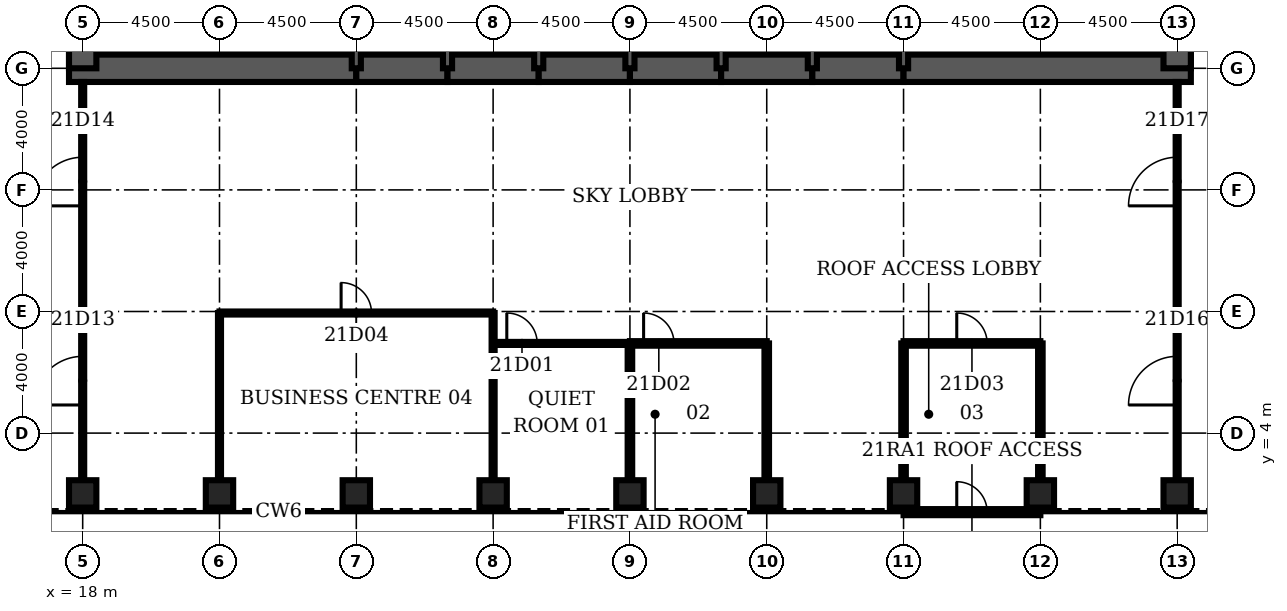
"""IFC4 building model, lengths in metres.
Left out: names, types, materials, properties, quantities, classifications, styles, units other than length and angle.
Written with IfcOpenShell. Run it as: python <this file> out.ifc"""

import sys

from ifc_helpers import new_model, si_unit, direction, frame, frame_2d, origin, origin_2d, place, context, subcontext, project, spatial, rectangle, hollow_rectangle, extrude, element, fill, save


model = new_model("IFC4")
c1 = context("Model", 3, precision=1e-05, world=origin(), true_north=direction((0.0, 1.0)))
c2 = subcontext(c1, "Body", "Model", "MODEL_VIEW")
j1 = project(units=[si_unit("LENGTHUNIT", "METRE"), si_unit("PLANEANGLEUNIT", "RADIAN")], contexts=[c1])
p1 = place(None, origin())
s1 = spatial("IfcSite", under=j1, at=p1, CompositionType="ELEMENT")
p2 = place(p1, origin())
s2 = spatial("IfcBuilding", under=s1, at=p2, CompositionType="ELEMENT")
p3 = place(p2, frame((0.0, 0.0, 100.5)))
s3 = spatial("IfcBuildingStorey", under=s2, at=p3, CompositionType="ELEMENT", Elevation=100.5)
for number, where, z_axis, x_axis in (
    (1, (18.0, 2.0, 0.0), (0.0, 0.0, 1.0), (0.0, 1.0, 0.0)),
    (2, (22.5, 2.0, 0.0), (0.0, 0.0, 1.0), (0.0, 1.0, 0.0)),
    (3, (27.0, 2.0, 0.0), (0.0, 0.0, 1.0), (0.0, 1.0, 0.0)),
    (4, (31.5, 2.0, 0.0), (0.0, 0.0, 1.0), (0.0, 1.0, 0.0)),
    (5, (36.0, 2.0, 0.0), (0.0, 0.0, 1.0), (0.0, 1.0, 0.0)),
    (6, (40.5, 2.0, 0.0), (0.0, 0.0, 1.0), (0.0, 1.0, 0.0)),
    (7, (45.0, 2.0, 0.0), (0.0, 0.0, 1.0), (0.0, 1.0, 0.0)),
    (8, (49.5, 2.0, 0.0), (0.0, 0.0, 1.0), (0.0, 1.0, 0.0)),
    (9, (54.0, 2.0, 0.0), (0.0, 0.0, 1.0), (0.0, 1.0, 0.0)),
):
    element("IfcColumn", number, at=place(p3, frame(where, z_axis=z_axis, x_axis=x_axis)), inside=s3, PredefinedType="COLUMN", context=c2, shape_type="SweptSolid", body=[
        extrude(hollow_rectangle(XDim=0.9, YDim=0.9, WallThickness=0.11, at=origin_2d()), origin(), (0.0, 0.0, 1.0), 4.2),
    ])
p4 = place(p3, frame((17.55, 16.0, 0.0), z_axis=(0.0, 0.0, 1.0), x_axis=(1.0, 0.0, 0.0)))
e10 = element("IfcWall", 10, at=p4, inside=s3, PredefinedType="SHEAR", context=c2, shape_type="SweptSolid", body=[
    extrude(rectangle(XDim=9.45, YDim=0.9, at=frame_2d((4.725, 0.0))), origin(), (0.0, 0.0, 1.0), 4.2),
])
for number, where, z_axis, x_axis in (
    (11, (27.0, 16.0, 0.0), (0.0, 0.0, 1.0), (1.0, 0.0, 0.0)),
    (12, (30.0, 16.0, 0.0), (0.0, 0.0, 1.0), (1.0, 0.0, 0.0)),
    (13, (33.0, 16.0, 0.0), (0.0, 0.0, 1.0), (1.0, 0.0, 0.0)),
    (14, (36.0, 16.0, 0.0), (0.0, 0.0, 1.0), (1.0, 0.0, 0.0)),
    (15, (39.0, 16.0, 0.0), (0.0, 0.0, 1.0), (1.0, 0.0, 0.0)),
    (16, (42.0, 16.0, 0.0), (0.0, 0.0, 1.0), (1.0, 0.0, 0.0)),
):
    element("IfcWall", number, at=place(p3, frame(where, z_axis=z_axis, x_axis=x_axis)), inside=s3, PredefinedType="SHEAR", context=c2, shape_type="SweptSolid", body=[
        extrude(rectangle(XDim=3.0, YDim=0.9, at=frame_2d((1.5, 0.0))), origin(), (0.0, 0.0, 1.0), 4.2),
    ])
p5 = place(p3, frame((45.0, 16.0, 0.0), z_axis=(0.0, 0.0, 1.0), x_axis=(1.0, 0.0, 0.0)))
e17 = element("IfcWall", 17, at=p5, inside=s3, PredefinedType="SHEAR", context=c2, shape_type="SweptSolid", body=[
    extrude(rectangle(XDim=9.45, YDim=0.9, at=frame_2d((4.725, 0.0))), origin(), (0.0, 0.0, 1.0), 4.2),
])
for number, where, z_axis, x_axis in (
    (18, (18.0, 19.2, 0.0), (0.0, 0.0, 1.0), (0.0, -1.0, 0.0)),
    (19, (54.0, 16.0, 0.0), (0.0, 0.0, 1.0), (0.0, 1.0, 0.0)),
):
    element("IfcWall", number, at=place(p3, frame(where, z_axis=z_axis, x_axis=x_axis)), inside=s3, PredefinedType="SHEAR", context=c2, shape_type="SweptSolid", body=[
        extrude(rectangle(XDim=3.2, YDim=0.9, at=frame_2d((1.6, 0.0))), origin(), (0.0, 0.0, 1.0), 4.2),
    ])
for number, where, z_axis, x_axis in (
    (20, (27.0, 16.0, 0.0), (0.0, 0.0, 1.0), (0.0, 1.0, 0.0)),
    (21, (30.0, 16.0, 0.0), (0.0, 0.0, 1.0), (0.0, 1.0, 0.0)),
    (22, (33.0, 16.0, 0.0), (0.0, 0.0, 1.0), (0.0, 1.0, 0.0)),
    (23, (36.0, 16.0, 0.0), (0.0, 0.0, 1.0), (0.0, 1.0, 0.0)),
    (24, (39.0, 16.0, 0.0), (0.0, 0.0, 1.0), (0.0, 1.0, 0.0)),
    (25, (42.0, 16.0, 0.0), (0.0, 0.0, 1.0), (0.0, 1.0, 0.0)),
    (26, (45.0, 16.0, 0.0), (0.0, 0.0, 1.0), (0.0, 1.0, 0.0)),
):
    element("IfcWall", number, at=place(p3, frame(where, z_axis=z_axis, x_axis=x_axis)), inside=s3, PredefinedType="SOLIDWALL", context=c2, shape_type="SweptSolid", body=[
        extrude(rectangle(XDim=3.2, YDim=0.3, at=frame_2d((1.6, 0.0))), origin(), (0.0, 0.0, 1.0), 4.2),
    ])
p6 = place(p3, frame((31.5, 6.95, 0.0), z_axis=(0.0, 0.0, 1.0), x_axis=(1.0, 0.0, 0.0)))
e27 = element("IfcWall", 27, at=p6, inside=s3, PredefinedType="PARTITIONING", context=c2, shape_type="SweptSolid", body=[
    extrude(rectangle(XDim=4.5, YDim=0.1, at=frame_2d((2.25, 0.0))), origin(), (0.0, 0.0, 1.0), 3.0),
])
p7 = place(p6, frame((0.45, 0.0, 0.0)))
e28 = element("IfcOpeningElement", 28, at=p7, cuts=e27, PredefinedType="OPENING", context=c2, shape_type="SweptSolid", body=[
    extrude(rectangle(XDim=1.0, YDim=2.1, at=frame_2d((0.5, 1.05))), frame((0.0, 0.06, 0.0), z_axis=(0.0, -1.0, 0.0), x_axis=(1.0, 0.0, 0.0)), (0.0, 0.0, 1.0), 0.12),
])
p8 = place(p3, frame((36.0, 6.95, 0.0), z_axis=(0.0, 0.0, 1.0), x_axis=(1.0, 0.0, 0.0)))
e29 = element("IfcWall", 29, at=p8, inside=s3, PredefinedType="PARTITIONING", context=c2, shape_type="SweptSolid", body=[
    extrude(rectangle(XDim=4.5, YDim=0.15, at=frame_2d((2.25, 0.0))), origin(), (0.0, 0.0, 1.0), 3.0),
])
p9 = place(p8, frame((0.45, 0.0, 0.0)))
e30 = element("IfcOpeningElement", 30, at=p9, cuts=e29, PredefinedType="OPENING", context=c2, shape_type="SweptSolid", body=[
    extrude(rectangle(XDim=1.0, YDim=2.1, at=frame_2d((0.5, 1.05))), frame((0.0, 0.085, 0.0), z_axis=(0.0, -1.0, 0.0), x_axis=(1.0, 0.0, 0.0)), (0.0, 0.0, 1.0), 0.17),
])
p10 = place(p3, frame((45.0, 6.95, 0.0), z_axis=(0.0, 0.0, 1.0), x_axis=(1.0, 0.0, 0.0)))
e31 = element("IfcWall", 31, at=p10, inside=s3, PredefinedType="PARTITIONING", context=c2, shape_type="SweptSolid", body=[
    extrude(rectangle(XDim=4.5, YDim=0.15, at=frame_2d((2.25, 0.0))), origin(), (0.0, 0.0, 1.0), 3.0),
])
p11 = place(p10, frame((1.75, 0.0, 0.0)))
e32 = element("IfcOpeningElement", 32, at=p11, cuts=e31, PredefinedType="OPENING", context=c2, shape_type="SweptSolid", body=[
    extrude(rectangle(XDim=1.0, YDim=2.1, at=frame_2d((0.5, 1.05))), frame((0.0, 0.085, 0.0), z_axis=(0.0, -1.0, 0.0), x_axis=(1.0, 0.0, 0.0)), (0.0, 0.0, 1.0), 0.17),
])
p12 = place(p3, frame((22.5, 7.95, 0.0), z_axis=(0.0, 0.0, 1.0), x_axis=(1.0, 0.0, 0.0)))
e33 = element("IfcWall", 33, at=p12, inside=s3, PredefinedType="PARTITIONING", context=c2, shape_type="SweptSolid", body=[
    extrude(rectangle(XDim=9.0, YDim=0.1, at=frame_2d((4.5, 0.0))), origin(), (0.0, 0.0, 1.0), 3.0),
])
p13 = place(p12, frame((4.0, 0.0, 0.0)))
e34 = element("IfcOpeningElement", 34, at=p13, cuts=e33, PredefinedType="OPENING", context=c2, shape_type="SweptSolid", body=[
    extrude(rectangle(XDim=1.0, YDim=2.1, at=frame_2d((0.5, 1.05))), frame((0.0, 0.06, 0.0), z_axis=(0.0, -1.0, 0.0), x_axis=(1.0, 0.0, 0.0)), (0.0, 0.0, 1.0), 0.12),
])
p14 = place(p3, frame((18.0, 2.45, 0.0), z_axis=(0.0, 0.0, 1.0), x_axis=(0.0, 1.0, 0.0)))
e35 = element("IfcWall", 35, at=p14, inside=s3, PredefinedType="PARTITIONING", context=c2, shape_type="SweptSolid", body=[
    extrude(rectangle(XDim=13.1, YDim=0.1, at=frame_2d((6.55, 0.0))), origin(), (0.0, 0.0, 1.0), 3.0),
])
p15 = place(p14, frame((2.475, 0.0, 0.0)))
e36 = element("IfcOpeningElement", 36, at=p15, cuts=e35, PredefinedType="OPENING", context=c2, shape_type="SweptSolid", body=[
    extrude(rectangle(XDim=1.6, YDim=2.1, at=frame_2d((0.8, 1.05))), frame((0.0, 0.06, 0.0), z_axis=(0.0, -1.0, 0.0), x_axis=(1.0, 0.0, 0.0)), (0.0, 0.0, 1.0), 0.12),
])
p16 = place(p14, frame((9.025, 0.0, 0.0)))
e37 = element("IfcOpeningElement", 37, at=p16, cuts=e35, PredefinedType="OPENING", context=c2, shape_type="SweptSolid", body=[
    extrude(rectangle(XDim=1.6, YDim=2.1, at=frame_2d((0.8, 1.05))), frame((0.0, 0.06, 0.0), z_axis=(0.0, -1.0, 0.0), x_axis=(1.0, 0.0, 0.0)), (0.0, 0.0, 1.0), 0.12),
])
for number, where, z_axis, x_axis in (
    (38, (22.5, 2.45, 0.0), (0.0, 0.0, 1.0), (0.0, 1.0, 0.0)),
    (39, (31.5, 2.45, 0.0), (0.0, 0.0, 1.0), (0.0, 1.0, 0.0)),
):
    element("IfcWall", number, at=place(p3, frame(where, z_axis=z_axis, x_axis=x_axis)), inside=s3, PredefinedType="PARTITIONING", context=c2, shape_type="SweptSolid", body=[
        extrude(rectangle(XDim=5.5, YDim=0.1, at=frame_2d((2.75, 0.0))), origin(), (0.0, 0.0, 1.0), 3.0),
    ])
for number, where, z_axis, x_axis in (
    (40, (36.0, 2.45, 0.0), (0.0, 0.0, 1.0), (0.0, 1.0, 0.0)),
    (41, (40.5, 2.45, 0.0), (0.0, 0.0, 1.0), (0.0, 1.0, 0.0)),
    (42, (45.0, 2.45, 0.0), (0.0, 0.0, 1.0), (0.0, 1.0, 0.0)),
    (43, (49.5, 2.45, 0.0), (0.0, 0.0, 1.0), (0.0, 1.0, 0.0)),
):
    element("IfcWall", number, at=place(p3, frame(where, z_axis=z_axis, x_axis=x_axis)), inside=s3, PredefinedType="PARTITIONING", context=c2, shape_type="SweptSolid", body=[
        extrude(rectangle(XDim=4.5, YDim=0.15, at=frame_2d((2.25, 0.0))), origin(), (0.0, 0.0, 1.0), 3.0),
    ])
p17 = place(p3, frame((54.0, 2.45, 0.0), z_axis=(0.0, 0.0, 1.0), x_axis=(0.0, 1.0, 0.0)))
e44 = element("IfcWall", 44, at=p17, inside=s3, PredefinedType="PARTITIONING", context=c2, shape_type="SweptSolid", body=[
    extrude(rectangle(XDim=13.1, YDim=0.1, at=frame_2d((6.55, 0.0))), origin(), (0.0, 0.0, 1.0), 3.0),
])
p18 = place(p17, frame((2.475, 0.0, 0.0)))
e45 = element("IfcOpeningElement", 45, at=p18, cuts=e44, PredefinedType="OPENING", context=c2, shape_type="SweptSolid", body=[
    extrude(rectangle(XDim=1.6, YDim=2.1, at=frame_2d((0.8, 1.05))), frame((0.0, 0.06, 0.0), z_axis=(0.0, -1.0, 0.0), x_axis=(1.0, 0.0, 0.0)), (0.0, 0.0, 1.0), 0.12),
])
p19 = place(p17, frame((9.025, 0.0, 0.0)))
e46 = element("IfcOpeningElement", 46, at=p19, cuts=e44, PredefinedType="OPENING", context=c2, shape_type="SweptSolid", body=[
    extrude(rectangle(XDim=1.6, YDim=2.1, at=frame_2d((0.8, 1.05))), frame((0.0, 0.06, 0.0), z_axis=(0.0, -1.0, 0.0), x_axis=(1.0, 0.0, 0.0)), (0.0, 0.0, 1.0), 0.12),
])
p20 = place(p3, frame((45.0, 1.4, 0.0), z_axis=(0.0, 0.0, 1.0), x_axis=(1.0, 0.0, 0.0)))
e47 = element("IfcWall", 47, at=p20, inside=s3, PredefinedType="SOLIDWALL", context=c2, shape_type="SweptSolid", body=[
    extrude(rectangle(XDim=4.5, YDim=0.2, at=frame_2d((2.25, 0.0))), origin(), (0.0, 0.0, 1.0), 4.04),
])
p21 = place(p20, frame((1.75, 0.0, 0.0)))
e48 = element("IfcOpeningElement", 48, at=p21, cuts=e47, PredefinedType="OPENING", context=c2, shape_type="SweptSolid", body=[
    extrude(rectangle(XDim=1.0, YDim=2.1, at=frame_2d((0.5, 1.05))), frame((0.0, 0.11, 0.0), z_axis=(0.0, -1.0, 0.0), x_axis=(1.0, 0.0, 0.0)), (0.0, 0.0, 1.0), 0.22),
])
p22 = place(p7, origin())
e49 = element("IfcDoor", 49, at=p22, inside=s3, OperationType="SINGLE_SWING_LEFT", PredefinedType="DOOR", context=c2, shape_type="SweptSolid", body=[
    extrude(rectangle(XDim=1.0, YDim=2.1, at=frame_2d((0.5, 1.05))), frame((0.0, 0.025, 0.0), z_axis=(0.0, -1.0, 0.0), x_axis=(1.0, 0.0, 0.0)), (0.0, 0.0, 1.0), 0.05),
])
fill(e28, e49)
p23 = place(p9, origin())
e50 = element("IfcDoor", 50, at=p23, inside=s3, OperationType="SINGLE_SWING_LEFT", PredefinedType="DOOR", context=c2, shape_type="SweptSolid", body=[
    extrude(rectangle(XDim=1.0, YDim=2.1, at=frame_2d((0.5, 1.05))), frame((0.0, 0.025, 0.0), z_axis=(0.0, -1.0, 0.0), x_axis=(1.0, 0.0, 0.0)), (0.0, 0.0, 1.0), 0.05),
])
fill(e30, e50)
p24 = place(p11, origin())
e51 = element("IfcDoor", 51, at=p24, inside=s3, OperationType="SINGLE_SWING_LEFT", PredefinedType="DOOR", context=c2, shape_type="SweptSolid", body=[
    extrude(rectangle(XDim=1.0, YDim=2.1, at=frame_2d((0.5, 1.05))), frame((0.0, 0.025, 0.0), z_axis=(0.0, -1.0, 0.0), x_axis=(1.0, 0.0, 0.0)), (0.0, 0.0, 1.0), 0.05),
])
fill(e32, e51)
p25 = place(p13, origin())
e52 = element("IfcDoor", 52, at=p25, inside=s3, OperationType="SINGLE_SWING_LEFT", PredefinedType="DOOR", context=c2, shape_type="SweptSolid", body=[
    extrude(rectangle(XDim=1.0, YDim=2.1, at=frame_2d((0.5, 1.05))), frame((0.0, 0.025, 0.0), z_axis=(0.0, -1.0, 0.0), x_axis=(1.0, 0.0, 0.0)), (0.0, 0.0, 1.0), 0.05),
])
fill(e34, e52)
p26 = place(p15, origin())
e53 = element("IfcDoor", 53, at=p26, inside=s3, OperationType="SINGLE_SWING_LEFT", PredefinedType="DOOR", context=c2, shape_type="SweptSolid", body=[
    extrude(rectangle(XDim=1.6, YDim=2.1, at=frame_2d((0.8, 1.05))), frame((0.0, 0.025, 0.0), z_axis=(0.0, -1.0, 0.0), x_axis=(1.0, 0.0, 0.0)), (0.0, 0.0, 1.0), 0.05),
])
fill(e36, e53)
p27 = place(p16, origin())
e54 = element("IfcDoor", 54, at=p27, inside=s3, OperationType="SINGLE_SWING_LEFT", PredefinedType="DOOR", context=c2, shape_type="SweptSolid", body=[
    extrude(rectangle(XDim=1.6, YDim=2.1, at=frame_2d((0.8, 1.05))), frame((0.0, 0.025, 0.0), z_axis=(0.0, -1.0, 0.0), x_axis=(1.0, 0.0, 0.0)), (0.0, 0.0, 1.0), 0.05),
])
fill(e37, e54)
p28 = place(p18, origin())
e55 = element("IfcDoor", 55, at=p28, inside=s3, OperationType="SINGLE_SWING_LEFT", PredefinedType="DOOR", context=c2, shape_type="SweptSolid", body=[
    extrude(rectangle(XDim=1.6, YDim=2.1, at=frame_2d((0.8, 1.05))), frame((0.0, 0.025, 0.0), z_axis=(0.0, -1.0, 0.0), x_axis=(1.0, 0.0, 0.0)), (0.0, 0.0, 1.0), 0.05),
])
fill(e45, e55)
p29 = place(p19, origin())
e56 = element("IfcDoor", 56, at=p29, inside=s3, OperationType="SINGLE_SWING_LEFT", PredefinedType="DOOR", context=c2, shape_type="SweptSolid", body=[
    extrude(rectangle(XDim=1.6, YDim=2.1, at=frame_2d((0.8, 1.05))), frame((0.0, 0.025, 0.0), z_axis=(0.0, -1.0, 0.0), x_axis=(1.0, 0.0, 0.0)), (0.0, 0.0, 1.0), 0.05),
])
fill(e46, e56)
p30 = place(p21, origin())
e57 = element("IfcDoor", 57, at=p30, inside=s3, OperationType="SINGLE_SWING_LEFT", PredefinedType="DOOR", context=c2, shape_type="SweptSolid", body=[
    extrude(rectangle(XDim=1.0, YDim=2.1, at=frame_2d((0.5, 1.05))), frame((0.0, 0.025, 0.0), z_axis=(0.0, -1.0, 0.0), x_axis=(1.0, 0.0, 0.0)), (0.0, 0.0, 1.0), 0.05),
])
fill(e48, e57)
save(model, sys.argv[1])
